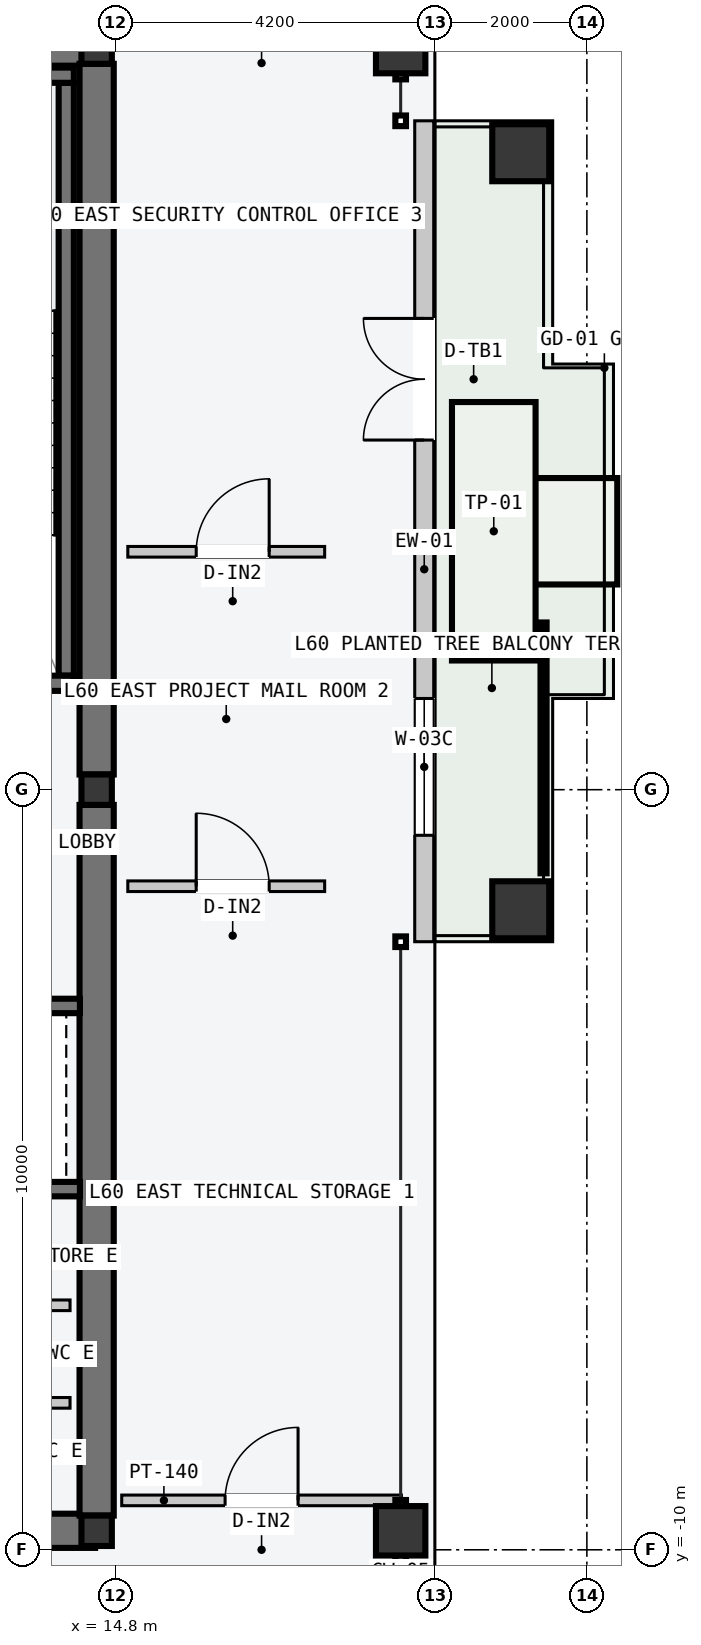
"""IFC4 building model, lengths in metres.
Left out: names, types, materials, properties, quantities, classifications, styles, units other than length and angle.
Written with IfcOpenShell. Run it as: python <this file> out.ifc"""

import sys

from ifc_helpers import new_model, si_unit, direction, frame, frame_2d, origin, origin_2d, place, context, subcontext, project, spatial, rectangle, hollow_rectangle, i_section, extrude, element, fill, save


model = new_model("IFC4")
c1 = context("Model", 3, precision=1e-05, world=origin(), true_north=direction((0.0, 1.0)))
c2 = subcontext(c1, "Body", "Model", "MODEL_VIEW")
j1 = project(units=[si_unit("LENGTHUNIT", "METRE"), si_unit("PLANEANGLEUNIT", "RADIAN")], contexts=[c1])
p1 = place(None, origin())
s1 = spatial("IfcSite", under=j1, at=p1, CompositionType="ELEMENT")
p2 = place(p1, origin())
s2 = spatial("IfcBuilding", under=s1, at=p2, CompositionType="ELEMENT")
p3 = place(p2, frame((0.0, 0.0, 229.2)))
s3 = spatial("IfcBuildingStorey", under=s2, at=p3, CompositionType="ELEMENT", Elevation=229.2)
for number, where, z_axis, x_axis in (
    (1, (8.07, -9.75, -0.2), (0.0, 0.0, 1.0), (1.0, 0.0, 0.0)),
    (2, (8.07, 9.75, -0.2), (0.0, 0.0, 1.0), (1.0, 0.0, 0.0)),
):
    element("IfcWall", number, at=place(p3, frame(where, z_axis=z_axis, x_axis=x_axis)), inside=s3, PredefinedType="SHEAR", context=c2, shape_type="SweptSolid", body=[
        extrude(rectangle(XDim=6.46, YDim=0.45, at=frame_2d((3.23, 0.0))), origin(), (0.0, 0.0, 1.0), 3.6),
    ])
for number, where, z_axis, x_axis in (
    (3, (14.55, -9.55, -0.2), (0.0, 0.0, 1.0), (0.0, 1.0, 0.0)),
    (4, (14.55, 0.2, -0.2), (0.0, 0.0, 1.0), (0.0, 1.0, 0.0)),
):
    element("IfcWall", number, at=place(p3, frame(where, z_axis=z_axis, x_axis=x_axis)), inside=s3, PredefinedType="SHEAR", context=c2, shape_type="SweptSolid", body=[
        extrude(rectangle(XDim=9.35, YDim=0.45, at=frame_2d((4.675, 0.0))), origin(), (0.0, 0.0, 1.0), 3.6),
    ])
p4 = place(p3, frame((14.15, 1.5, -0.2), z_axis=(0.0, 0.0, 1.0), x_axis=(0.0, 1.0, 0.0)))
e5 = element("IfcWall", 5, at=p4, inside=s3, PredefinedType="SOLIDWALL", context=c2, shape_type="SweptSolid", body=[
    extrude(rectangle(XDim=7.8, YDim=0.2, at=frame_2d((3.9, 0.0))), origin(), (0.0, 0.0, 1.0), 3.6),
])
p5 = place(p3, frame((10.53, 1.4, -0.2), z_axis=(0.0, 0.0, 1.0), x_axis=(1.0, 0.0, 0.0)))
e6 = element("IfcWall", 6, at=p5, inside=s3, PredefinedType="SOLIDWALL", context=c2, shape_type="SweptSolid", body=[
    extrude(rectangle(XDim=3.72, YDim=0.2, at=frame_2d((1.86, 0.0))), origin(), (0.0, 0.0, 1.0), 3.6),
])
p6 = place(p5, frame((1.5, 0.0, 0.2)))
e7 = element("IfcOpeningElement", 7, at=p6, cuts=e6, PredefinedType="OPENING", context=c2, shape_type="SweptSolid", body=[
    extrude(rectangle(XDim=1.12, YDim=2.18, at=frame_2d((0.56, 1.09))), frame((0.0, 0.11, 0.0), z_axis=(0.0, -1.0, 0.0), x_axis=(1.0, 0.0, 0.0)), (0.0, 0.0, 1.0), 0.22),
])
p7 = place(p3, frame((10.53, 9.4, -0.2), z_axis=(0.0, 0.0, 1.0), x_axis=(1.0, 0.0, 0.0)))
e8 = element("IfcWall", 8, at=p7, inside=s3, PredefinedType="SOLIDWALL", context=c2, shape_type="SweptSolid", body=[
    extrude(rectangle(XDim=3.72, YDim=0.2, at=frame_2d((1.86, 0.0))), origin(), (0.0, 0.0, 1.0), 3.6),
])
for number, where, z_axis, x_axis in (
    (9, (14.55, -9.75, 0.0), (0.0, 0.0, 1.0), (1.0, 0.0, 0.0)),
    (10, (14.55, 0.0, 0.0), (0.0, 0.0, 1.0), (1.0, 0.0, 0.0)),
    (11, (14.55, 9.75, 0.0), (0.0, 0.0, 1.0), (1.0, 0.0, 0.0)),
):
    element("IfcColumn", number, at=place(p3, frame(where, z_axis=z_axis, x_axis=x_axis)), inside=s3, PredefinedType="COLUMN", context=c2, shape_type="SweptSolid", body=[
        extrude(i_section(OverallWidth=0.4, OverallDepth=0.4, WebThickness=0.013, FlangeThickness=0.021, at=origin_2d()), origin(), (0.0, 0.0, 1.0), 3.6),
    ])
for number, where, z_axis, x_axis in (
    (12, (18.55, -9.75, 0.0), (0.0, 0.0, 1.0), (0.0, 1.0, 0.0)),
    (13, (18.55, 9.75, 0.0), (0.0, 0.0, 1.0), (0.0, 1.0, 0.0)),
):
    element("IfcColumn", number, at=place(p3, frame(where, z_axis=z_axis, x_axis=x_axis)), inside=s3, PredefinedType="COLUMN", context=c2, shape_type="SweptSolid", body=[
        extrude(hollow_rectangle(XDim=0.65, YDim=0.65, WallThickness=0.028, at=origin_2d()), origin(), (0.0, 0.0, 1.0), 3.6),
    ])
for number, where, z_axis, x_axis in (
    (14, (20.13, -1.58, 0.0), (0.0, 0.0, 1.0), (0.0, 1.0, 0.0)),
    (15, (20.13, 8.38, 0.0), (0.0, 0.0, 1.0), (0.0, 1.0, 0.0)),
):
    element("IfcColumn", number, at=place(p3, frame(where, z_axis=z_axis, x_axis=x_axis)), inside=s3, PredefinedType="COLUMN", context=c2, shape_type="SweptSolid", body=[
        extrude(hollow_rectangle(XDim=0.75, YDim=0.75, WallThickness=0.032, at=origin_2d()), origin(), (0.0, 0.0, 1.0), 3.6),
    ])
p8 = place(p3, frame((18.86, -2.0, 0.0), z_axis=(0.0, 0.0, 1.0), x_axis=(0.0, 1.0, 0.0)))
e16 = element("IfcWall", 16, at=p8, inside=s3, PredefinedType="STANDARD", context=c2, shape_type="SweptSolid", body=[
    extrude(rectangle(XDim=10.8, YDim=0.25, at=frame_2d((5.4, 0.0))), origin(), (0.0, 0.0, 1.0), 3.4),
])
p9 = place(p8, frame((6.6, 0.0, 0.0)))
e17 = element("IfcOpeningElement", 17, at=p9, cuts=e16, PredefinedType="OPENING", context=c2, shape_type="SweptSolid", body=[
    extrude(rectangle(XDim=1.6, YDim=2.2, at=frame_2d((0.8, 1.1))), frame((0.0, 0.135, 0.0), z_axis=(0.0, -1.0, 0.0), x_axis=(1.0, 0.0, 0.0)), (0.0, 0.0, 1.0), 0.27),
])
p10 = place(p8, frame((1.4, 0.0, 0.85)))
e18 = element("IfcOpeningElement", 18, at=p10, cuts=e16, PredefinedType="OPENING", context=c2, shape_type="SweptSolid", body=[
    extrude(rectangle(XDim=1.8, YDim=2.05, at=frame_2d((0.9, 1.025))), frame((0.0, 0.135, 0.0), z_axis=(0.0, -1.0, 0.0), x_axis=(1.0, 0.0, 0.0)), (0.0, 0.0, 1.0), 0.27),
])
p11 = place(p3, frame((11.65, -2.845, -0.2), z_axis=(0.0, 0.0, 1.0), x_axis=(1.0, 0.0, 0.0)))
e19 = element("IfcWall", 19, at=p11, inside=s3, PredefinedType="SOLIDWALL", context=c2, shape_type="SweptSolid", body=[
    extrude(rectangle(XDim=2.68, YDim=0.19, at=frame_2d((1.34, 0.0))), origin(), (0.0, 0.0, 1.0), 3.6),
])
p12 = place(p11, frame((0.65, 0.0, 0.2)))
e20 = element("IfcOpeningElement", 20, at=p12, cuts=e19, PredefinedType="OPENING", context=c2, shape_type="SweptSolid", body=[
    extrude(rectangle(XDim=1.2, YDim=2.2, at=frame_2d((0.6, 1.1))), frame((0.0, 0.105, 0.0), z_axis=(0.0, -1.0, 0.0), x_axis=(1.0, 0.0, 0.0)), (0.0, 0.0, 1.0), 0.21),
])
p13 = place(p3, frame((11.65, -5.255, -0.2), z_axis=(0.0, 0.0, 1.0), x_axis=(1.0, 0.0, 0.0)))
e21 = element("IfcWall", 21, at=p13, inside=s3, PredefinedType="SOLIDWALL", context=c2, shape_type="SweptSolid", body=[
    extrude(rectangle(XDim=2.68, YDim=0.19, at=frame_2d((1.34, 0.0))), origin(), (0.0, 0.0, 1.0), 3.6),
])
for number, where, z_axis, x_axis in (
    (22, (11.7, -8.067, 0.0), (0.0, 0.0, 1.0), (1.0, 0.0, 0.0)),
    (23, (11.7, -6.783, 0.0), (0.0, 0.0, 1.0), (1.0, 0.0, 0.0)),
):
    element("IfcWall", number, at=place(p3, frame(where, z_axis=z_axis, x_axis=x_axis)), inside=s3, PredefinedType="PARTITIONING", context=c2, shape_type="SweptSolid", body=[
        extrude(rectangle(XDim=2.5, YDim=0.14, at=frame_2d((1.25, 0.0))), origin(), (0.0, 0.0, 1.0), 3.4),
    ])
p14 = place(p3, frame((14.88, -9.35, 0.0), z_axis=(0.0, 0.0, 1.0), x_axis=(1.0, 0.0, 0.0)))
e24 = element("IfcWall", 24, at=p14, inside=s3, PredefinedType="PARTITIONING", context=c2, shape_type="SweptSolid", body=[
    extrude(rectangle(XDim=3.68, YDim=0.14, at=frame_2d((1.84, 0.0))), origin(), (0.0, 0.0, 1.0), 3.4),
])
p15 = place(p14, frame((1.36, 0.0, 0.0)))
e25 = element("IfcOpeningElement", 25, at=p15, cuts=e24, PredefinedType="OPENING", context=c2, shape_type="SweptSolid", body=[
    extrude(rectangle(XDim=0.96, YDim=2.18, at=frame_2d((0.48, 1.09))), frame((0.0, 0.08, 0.0), z_axis=(0.0, -1.0, 0.0), x_axis=(1.0, 0.0, 0.0)), (0.0, 0.0, 1.0), 0.16),
])
p16 = place(p3, frame((14.96, -1.27, 0.0), z_axis=(0.0, 0.0, 1.0), x_axis=(1.0, 0.0, 0.0)))
e26 = element("IfcWall", 26, at=p16, inside=s3, PredefinedType="PARTITIONING", context=c2, shape_type="SweptSolid", body=[
    extrude(rectangle(XDim=2.59, YDim=0.14, at=frame_2d((1.295, 0.0))), origin(), (0.0, 0.0, 1.0), 3.4),
])
p17 = place(p16, frame((0.9, 0.0, 0.0)))
e27 = element("IfcOpeningElement", 27, at=p17, cuts=e26, PredefinedType="OPENING", context=c2, shape_type="SweptSolid", body=[
    extrude(rectangle(XDim=0.96, YDim=2.18, at=frame_2d((0.48, 1.09))), frame((0.0, 0.08, 0.0), z_axis=(0.0, -1.0, 0.0), x_axis=(1.0, 0.0, 0.0)), (0.0, 0.0, 1.0), 0.16),
])
p18 = place(p3, frame((14.96, 3.13, 0.0), z_axis=(0.0, 0.0, 1.0), x_axis=(1.0, 0.0, 0.0)))
e28 = element("IfcWall", 28, at=p18, inside=s3, PredefinedType="PARTITIONING", context=c2, shape_type="SweptSolid", body=[
    extrude(rectangle(XDim=2.59, YDim=0.14, at=frame_2d((1.295, 0.0))), origin(), (0.0, 0.0, 1.0), 3.4),
])
p19 = place(p18, frame((0.9, 0.0, 0.0)))
e29 = element("IfcOpeningElement", 29, at=p19, cuts=e28, PredefinedType="OPENING", context=c2, shape_type="SweptSolid", body=[
    extrude(rectangle(XDim=0.96, YDim=2.18, at=frame_2d((0.48, 1.09))), frame((0.0, 0.08, 0.0), z_axis=(0.0, -1.0, 0.0), x_axis=(1.0, 0.0, 0.0)), (0.0, 0.0, 1.0), 0.16),
])
p20 = place(p9, origin())
e30 = element("IfcDoor", 30, at=p20, inside=s3, OperationType="DOUBLE_DOOR_SINGLE_SWING", PredefinedType="DOOR", context=c2, shape_type="SweptSolid", body=[
    extrude(rectangle(XDim=1.6, YDim=2.2, at=frame_2d((0.8, 1.1))), frame((0.0, 0.025, 0.0), z_axis=(0.0, -1.0, 0.0), x_axis=(1.0, 0.0, 0.0)), (0.0, 0.0, 1.0), 0.05),
])
fill(e17, e30)
p21 = place(p10, origin())
e31 = element("IfcWindow", 31, at=p21, inside=s3, PartitioningType="SINGLE_PANEL", PredefinedType="WINDOW", context=c2, shape_type="SweptSolid", body=[
    extrude(rectangle(XDim=1.8, YDim=2.05, at=frame_2d((0.9, 1.025))), frame((0.0, 0.03, 0.0), z_axis=(0.0, -1.0, 0.0), x_axis=(1.0, 0.0, 0.0)), (0.0, 0.0, 1.0), 0.06),
])
fill(e18, e31)
p22 = place(p15, origin())
e32 = element("IfcDoor", 32, at=p22, inside=s3, OperationType="SINGLE_SWING_RIGHT", PredefinedType="DOOR", context=c2, shape_type="SweptSolid", body=[
    extrude(rectangle(XDim=0.96, YDim=2.18, at=frame_2d((0.48, 1.09))), frame((0.0, 0.025, 0.0), z_axis=(0.0, -1.0, 0.0), x_axis=(1.0, 0.0, 0.0)), (0.0, 0.0, 1.0), 0.05),
])
fill(e25, e32)
p23 = place(p17, origin())
e33 = element("IfcDoor", 33, at=p23, inside=s3, OperationType="SINGLE_SWING_LEFT", PredefinedType="DOOR", context=c2, shape_type="SweptSolid", body=[
    extrude(rectangle(XDim=0.96, YDim=2.18, at=frame_2d((0.48, 1.09))), frame((0.0, 0.025, 0.0), z_axis=(0.0, -1.0, 0.0), x_axis=(1.0, 0.0, 0.0)), (0.0, 0.0, 1.0), 0.05),
])
fill(e27, e33)
p24 = place(p19, origin())
e34 = element("IfcDoor", 34, at=p24, inside=s3, OperationType="SINGLE_SWING_RIGHT", PredefinedType="DOOR", context=c2, shape_type="SweptSolid", body=[
    extrude(rectangle(XDim=0.96, YDim=2.18, at=frame_2d((0.48, 1.09))), frame((0.0, 0.025, 0.0), z_axis=(0.0, -1.0, 0.0), x_axis=(1.0, 0.0, 0.0)), (0.0, 0.0, 1.0), 0.05),
])
fill(e29, e34)
save(model, sys.argv[1])
